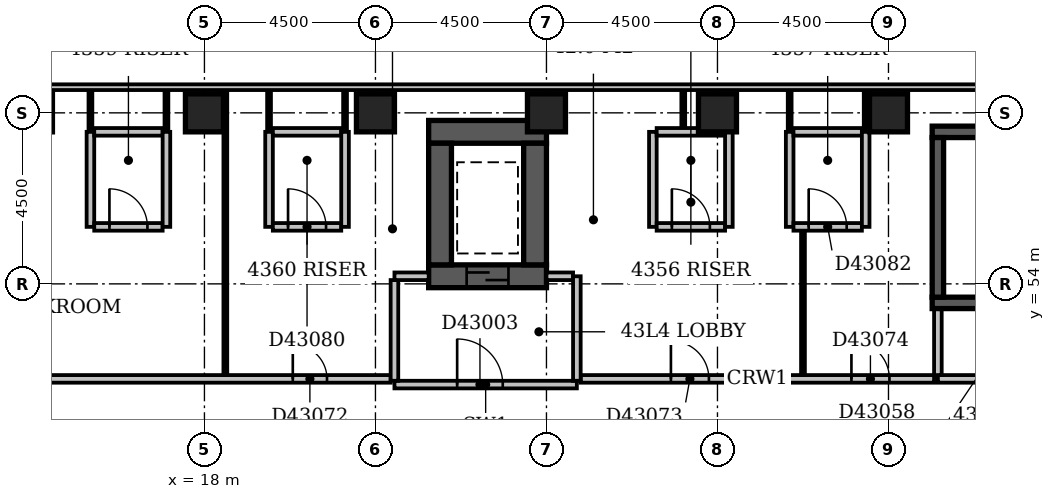
"""IFC4 building model, lengths in metres.
Left out: names, types, materials, properties, quantities, classifications, styles, units other than length and angle.
Written with IfcOpenShell. Run it as: python <this file> out.ifc"""

import sys

from ifc_helpers import new_model, si_unit, direction, frame, frame_2d, origin, origin_2d, place, context, subcontext, project, spatial, rectangle, extrude, element, fill, save


model = new_model("IFC4")
c1 = context("Model", 3, precision=1e-05, world=origin(), true_north=direction((0.0, 1.0)))
c2 = subcontext(c1, "Body", "Model", "MODEL_VIEW")
j1 = project(units=[si_unit("LENGTHUNIT", "METRE"), si_unit("PLANEANGLEUNIT", "RADIAN")], contexts=[c1])
p1 = place(None, origin())
s1 = spatial("IfcSite", under=j1, at=p1, CompositionType="ELEMENT")
p2 = place(p1, origin())
s2 = spatial("IfcBuilding", under=s1, at=p2, CompositionType="ELEMENT")
p3 = place(p2, frame((0.0, 0.0, 170.0)))
s3 = spatial("IfcBuildingStorey", under=s2, at=p3, CompositionType="ELEMENT", Elevation=170.0)
p4 = place(p3, frame((23.9, 54.2, -0.3), z_axis=(0.0, 0.0, 1.0), x_axis=(1.0, 0.0, 0.0)))
e1 = element("IfcWall", 1, at=p4, inside=s3, PredefinedType="SHEAR", context=c2, shape_type="SweptSolid", body=[
    extrude(rectangle(XDim=3.1, YDim=0.6, at=frame_2d((1.55, 0.0))), origin(), (0.0, 0.0, 1.0), 3.45),
])
p5 = place(p4, frame((1.0, 0.0, 0.3)))
e2 = element("IfcOpeningElement", 2, at=p5, cuts=e1, PredefinedType="OPENING", context=c2, shape_type="SweptSolid", body=[
    extrude(rectangle(XDim=1.1, YDim=2.1, at=frame_2d((0.55, 1.05))), frame((0.0, 0.312, 0.0), z_axis=(0.0, -1.0, 0.0), x_axis=(1.0, 0.0, 0.0)), (0.0, 0.0, 1.0), 0.624),
])
p6 = place(p3, frame((23.9, 58.0, -0.3), z_axis=(0.0, 0.0, 1.0), x_axis=(1.0, 0.0, 0.0)))
e3 = element("IfcWall", 3, at=p6, inside=s3, PredefinedType="SHEAR", context=c2, shape_type="SweptSolid", body=[
    extrude(rectangle(XDim=3.1, YDim=0.6, at=frame_2d((1.55, 0.0))), origin(), (0.0, 0.0, 1.0), 3.45),
])
for number, where, z_axis, x_axis in (
    (4, (24.2, 54.5, -0.3), (0.0, 0.0, 1.0), (0.0, 1.0, 0.0)),
    (5, (26.7, 54.5, -0.3), (0.0, 0.0, 1.0), (0.0, 1.0, 0.0)),
):
    element("IfcWall", number, at=place(p3, frame(where, z_axis=z_axis, x_axis=x_axis)), inside=s3, PredefinedType="SHEAR", context=c2, shape_type="SweptSolid", body=[
        extrude(rectangle(XDim=3.2, YDim=0.6, at=frame_2d((1.6, 0.0))), origin(), (0.0, 0.0, 1.0), 3.45),
    ])
p7 = place(p3, frame((37.15, 53.5, -0.3), z_axis=(0.0, 0.0, 1.0), x_axis=(1.0, 0.0, 0.0)))
e6 = element("IfcWall", 6, at=p7, inside=s3, PredefinedType="SHEAR", context=c2, shape_type="SweptSolid", body=[
    extrude(rectangle(XDim=7.0, YDim=0.3, at=frame_2d((3.5, 0.0))), origin(), (0.0, 0.0, 1.0), 3.45),
])
p8 = place(p7, frame((5.58, 0.0, 0.3)))
e7 = element("IfcOpeningElement", 7, at=p8, cuts=e6, PredefinedType="OPENING", context=c2, shape_type="SweptSolid", body=[
    extrude(rectangle(XDim=1.1, YDim=2.1, at=frame_2d((0.55, 1.05))), frame((0.0, 0.162, 0.0), z_axis=(0.0, -1.0, 0.0), x_axis=(1.0, 0.0, 0.0)), (0.0, 0.0, 1.0), 0.324),
])
p9 = place(p3, frame((37.15, 58.0, -0.3), z_axis=(0.0, 0.0, 1.0), x_axis=(1.0, 0.0, 0.0)))
e8 = element("IfcWall", 8, at=p9, inside=s3, PredefinedType="SHEAR", context=c2, shape_type="SweptSolid", body=[
    extrude(rectangle(XDim=7.35, YDim=0.3, at=frame_2d((3.675, 0.0))), origin(), (0.0, 0.0, 1.0), 3.45),
])
p10 = place(p3, frame((37.3, 53.65, -0.3), z_axis=(0.0, 0.0, 1.0), x_axis=(0.0, 1.0, 0.0)))
e9 = element("IfcWall", 9, at=p10, inside=s3, PredefinedType="SHEAR", context=c2, shape_type="SweptSolid", body=[
    extrude(rectangle(XDim=4.2, YDim=0.3, at=frame_2d((2.1, 0.0))), origin(), (0.0, 0.0, 1.0), 3.45),
])
for number, where, z_axis, x_axis in (
    (10, (18.0, 58.5, -0.3), (0.0, 0.0, 1.0), (1.0, 0.0, 0.0)),
    (11, (22.5, 58.5, -0.3), (0.0, 0.0, 1.0), (1.0, 0.0, 0.0)),
    (12, (27.0, 58.5, -0.3), (0.0, 0.0, 1.0), (1.0, 0.0, 0.0)),
    (13, (31.5, 58.5, -0.3), (0.0, 0.0, 1.0), (1.0, 0.0, 0.0)),
    (14, (36.0, 58.5, -0.3), (0.0, 0.0, 1.0), (1.0, 0.0, 0.0)),
):
    element("IfcColumn", number, at=place(p3, frame(where, z_axis=z_axis, x_axis=x_axis)), inside=s3, PredefinedType="COLUMN", context=c2, shape_type="SweptSolid", body=[
        extrude(rectangle(XDim=1.0, YDim=1.0, at=origin_2d()), origin(), (0.0, 0.0, 1.0), 3.45),
    ])
p11 = place(p3, frame((68.1, 59.175, 0.0), z_axis=(0.0, 0.0, 1.0), x_axis=(-1.0, 0.0, 0.0)))
e15 = element("IfcWall", 15, at=p11, inside=s3, PredefinedType="STANDARD", context=c2, shape_type="SweptSolid", body=[
    extrude(rectangle(XDim=68.85, YDim=0.15, at=frame_2d((34.425, 0.0))), origin(), (0.0, 0.0, 1.0), 2.5),
])
p12 = place(p11, frame((1.65, 0.0, 0.6)))
e16 = element("IfcOpeningElement", 16, at=p12, cuts=e15, PredefinedType="OPENING", context=c2, shape_type="SweptSolid", body=[
    extrude(rectangle(XDim=2.4, YDim=1.8, at=frame_2d((1.2, 0.9))), frame((0.0, 0.087, 0.0), z_axis=(0.0, -1.0, 0.0), x_axis=(1.0, 0.0, 0.0)), (0.0, 0.0, 1.0), 0.174),
])
p13 = place(p11, frame((5.823, 0.0, 0.6)))
e17 = element("IfcOpeningElement", 17, at=p13, cuts=e15, PredefinedType="OPENING", context=c2, shape_type="SweptSolid", body=[
    extrude(rectangle(XDim=2.1, YDim=1.8, at=frame_2d((1.05, 0.9))), frame((0.0, 0.087, 0.0), z_axis=(0.0, -1.0, 0.0), x_axis=(1.0, 0.0, 0.0)), (0.0, 0.0, 1.0), 0.174),
])
p14 = place(p11, frame((20.277, 0.0, 0.6)))
e18 = element("IfcOpeningElement", 18, at=p14, cuts=e15, PredefinedType="OPENING", context=c2, shape_type="SweptSolid", body=[
    extrude(rectangle(XDim=2.1, YDim=1.8, at=frame_2d((1.05, 0.9))), frame((0.0, 0.087, 0.0), z_axis=(0.0, -1.0, 0.0), x_axis=(1.0, 0.0, 0.0)), (0.0, 0.0, 1.0), 0.174),
])
p15 = place(p3, frame((23.0, 51.35, 0.0), z_axis=(0.0, 0.0, 1.0), x_axis=(1.0, 0.0, 0.0)))
e19 = element("IfcWall", 19, at=p15, inside=s3, PredefinedType="PARTITIONING", context=c2, shape_type="SweptSolid", body=[
    extrude(rectangle(XDim=4.8, YDim=0.2, at=frame_2d((2.4, 0.0))), origin(), (0.0, 0.0, 1.0), 3.15),
])
p16 = place(p15, frame((1.65, 0.0, 0.0)))
e20 = element("IfcOpeningElement", 20, at=p16, cuts=e19, PredefinedType="OPENING", context=c2, shape_type="SweptSolid", body=[
    extrude(rectangle(XDim=1.2, YDim=2.1, at=frame_2d((0.6, 1.05))), frame((0.0, 0.112, 0.0), z_axis=(0.0, -1.0, 0.0), x_axis=(1.0, 0.0, 0.0)), (0.0, 0.0, 1.0), 0.224),
])
p17 = place(p3, frame((27.8, 51.45, 0.0), z_axis=(0.0, 0.0, 1.0), x_axis=(0.0, 1.0, 0.0)))
e21 = element("IfcWall", 21, at=p17, inside=s3, PredefinedType="PARTITIONING", context=c2, shape_type="SweptSolid", body=[
    extrude(rectangle(XDim=2.75, YDim=0.2, at=frame_2d((1.375, 0.0))), origin(), (0.0, 0.0, 1.0), 3.15),
])
p18 = place(p3, frame((23.0, 54.2, 0.0), z_axis=(0.0, 0.0, 1.0), x_axis=(1.0, 0.0, 0.0)))
e22 = element("IfcWall", 22, at=p18, inside=s3, PredefinedType="PARTITIONING", context=c2, shape_type="SweptSolid", body=[
    extrude(rectangle(XDim=0.9, YDim=0.2, at=frame_2d((0.45, 0.0))), origin(), (0.0, 0.0, 1.0), 3.15),
])
p19 = place(p3, frame((27.0, 54.2, 0.0), z_axis=(0.0, 0.0, 1.0), x_axis=(1.0, 0.0, 0.0)))
e23 = element("IfcWall", 23, at=p19, inside=s3, PredefinedType="PARTITIONING", context=c2, shape_type="SweptSolid", body=[
    extrude(rectangle(XDim=0.7, YDim=0.2, at=frame_2d((0.35, 0.0))), origin(), (0.0, 0.0, 1.0), 3.15),
])
p20 = place(p3, frame((23.0, 51.45, 0.0), z_axis=(0.0, 0.0, 1.0), x_axis=(0.0, 1.0, 0.0)))
e24 = element("IfcWall", 24, at=p20, inside=s3, PredefinedType="PARTITIONING", context=c2, shape_type="SweptSolid", body=[
    extrude(rectangle(XDim=2.65, YDim=0.2, at=frame_2d((1.325, 0.0))), origin(), (0.0, 0.0, 1.0), 3.15),
])
p21 = place(p3, frame((37.3, 51.5, 0.0), z_axis=(0.0, 0.0, 1.0), x_axis=(1.0, 0.0, 0.0)))
e25 = element("IfcWall", 25, at=p21, inside=s3, PredefinedType="PARTITIONING", context=c2, shape_type="SweptSolid", body=[
    extrude(rectangle(XDim=6.7, YDim=0.2, at=frame_2d((3.35, 0.0))), origin(), (0.0, 0.0, 1.0), 3.15),
])
p22 = place(p21, frame((2.75, 0.0, 0.0)))
e26 = element("IfcOpeningElement", 26, at=p22, cuts=e25, PredefinedType="OPENING", context=c2, shape_type="SweptSolid", body=[
    extrude(rectangle(XDim=1.2, YDim=2.1, at=frame_2d((0.6, 1.05))), frame((0.0, 0.112, 0.0), z_axis=(0.0, -1.0, 0.0), x_axis=(1.0, 0.0, 0.0)), (0.0, 0.0, 1.0), 0.224),
])
p23 = place(p3, frame((37.3, 51.6, 0.0), z_axis=(0.0, 0.0, 1.0), x_axis=(0.0, 1.0, 0.0)))
e27 = element("IfcWall", 27, at=p23, inside=s3, PredefinedType="PARTITIONING", context=c2, shape_type="SweptSolid", body=[
    extrude(rectangle(XDim=1.73, YDim=0.2, at=frame_2d((0.865, 0.0))), origin(), (0.0, 0.0, 1.0), 3.15),
])
p24 = place(p3, frame((7.6, 51.5, 0.0), z_axis=(0.0, 0.0, 1.0), x_axis=(1.0, 0.0, 0.0)))
e28 = element("IfcWall", 28, at=p24, inside=s3, PredefinedType="PARTITIONING", context=c2, shape_type="SweptSolid", body=[
    extrude(rectangle(XDim=15.3, YDim=0.2, at=frame_2d((7.65, 0.0))), origin(), (0.0, 0.0, 1.0), 3.15),
])
p25 = place(p24, frame((4.975, 0.0, 0.0)))
e29 = element("IfcOpeningElement", 29, at=p25, cuts=e28, PredefinedType="OPENING", context=c2, shape_type="SweptSolid", body=[
    extrude(rectangle(XDim=0.9, YDim=2.1, at=frame_2d((0.45, 1.05))), frame((0.0, 0.112, 0.0), z_axis=(0.0, -1.0, 0.0), x_axis=(1.0, 0.0, 0.0)), (0.0, 0.0, 1.0), 0.224),
])
p26 = place(p24, frame((12.725, 0.0, 0.0)))
e30 = element("IfcOpeningElement", 30, at=p26, cuts=e28, PredefinedType="OPENING", context=c2, shape_type="SweptSolid", body=[
    extrude(rectangle(XDim=0.9, YDim=2.1, at=frame_2d((0.45, 1.05))), frame((0.0, 0.112, 0.0), z_axis=(0.0, -1.0, 0.0), x_axis=(1.0, 0.0, 0.0)), (0.0, 0.0, 1.0), 0.224),
])
p27 = place(p3, frame((27.9, 51.5, 0.0), z_axis=(0.0, 0.0, 1.0), x_axis=(1.0, 0.0, 0.0)))
e31 = element("IfcWall", 31, at=p27, inside=s3, PredefinedType="PARTITIONING", context=c2, shape_type="SweptSolid", body=[
    extrude(rectangle(XDim=9.3, YDim=0.2, at=frame_2d((4.65, 0.0))), origin(), (0.0, 0.0, 1.0), 3.15),
])
p28 = place(p27, frame((2.375, 0.0, 0.0)))
e32 = element("IfcOpeningElement", 32, at=p28, cuts=e31, PredefinedType="OPENING", context=c2, shape_type="SweptSolid", body=[
    extrude(rectangle(XDim=1.0, YDim=2.1, at=frame_2d((0.5, 1.05))), frame((0.0, 0.112, 0.0), z_axis=(0.0, -1.0, 0.0), x_axis=(1.0, 0.0, 0.0)), (0.0, 0.0, 1.0), 0.224),
])
p29 = place(p27, frame((7.125, 0.0, 0.0)))
e33 = element("IfcOpeningElement", 33, at=p29, cuts=e31, PredefinedType="OPENING", context=c2, shape_type="SweptSolid", body=[
    extrude(rectangle(XDim=1.0, YDim=2.1, at=frame_2d((0.5, 1.05))), frame((0.0, 0.112, 0.0), z_axis=(0.0, -1.0, 0.0), x_axis=(1.0, 0.0, 0.0)), (0.0, 0.0, 1.0), 0.224),
])
p30 = place(p3, frame((18.55, 51.6, 0.0), z_axis=(0.0, 0.0, 1.0), x_axis=(0.0, 1.0, 0.0)))
e34 = element("IfcWall", 34, at=p30, inside=s3, PredefinedType="PARTITIONING", context=c2, shape_type="SweptSolid", body=[
    extrude(rectangle(XDim=7.5, YDim=0.1, at=frame_2d((3.75, 0.0))), origin(), (0.0, 0.0, 1.0), 3.15),
])
p31 = place(p3, frame((33.75, 51.6, 0.0), z_axis=(0.0, 0.0, 1.0), x_axis=(0.0, 1.0, 0.0)))
e35 = element("IfcWall", 35, at=p31, inside=s3, PredefinedType="PARTITIONING", context=c2, shape_type="SweptSolid", body=[
    extrude(rectangle(XDim=3.8, YDim=0.1, at=frame_2d((1.9, 0.0))), origin(), (0.0, 0.0, 1.0), 3.15),
])
p32 = place(p3, frame((15.0, 55.5, 0.0), z_axis=(0.0, 0.0, 1.0), x_axis=(0.0, 1.0, 0.0)))
e36 = element("IfcWall", 36, at=p32, inside=s3, PredefinedType="PARTITIONING", context=c2, shape_type="SweptSolid", body=[
    extrude(rectangle(XDim=2.5, YDim=0.2, at=frame_2d((1.25, 0.0))), origin(), (0.0, 0.0, 1.0), 3.15),
])
p33 = place(p3, frame((15.1, 55.5, 0.0), z_axis=(0.0, 0.0, 1.0), x_axis=(1.0, 0.0, 0.0)))
e37 = element("IfcWall", 37, at=p33, inside=s3, PredefinedType="PARTITIONING", context=c2, shape_type="SweptSolid", body=[
    extrude(rectangle(XDim=1.8, YDim=0.2, at=frame_2d((0.9, 0.0))), origin(), (0.0, 0.0, 1.0), 3.15),
])
p34 = place(p33, frame((0.4, 0.0, 0.0)))
e38 = element("IfcOpeningElement", 38, at=p34, cuts=e37, PredefinedType="OPENING", context=c2, shape_type="SweptSolid", body=[
    extrude(rectangle(XDim=1.0, YDim=2.1, at=frame_2d((0.5, 1.05))), frame((0.0, 0.112, 0.0), z_axis=(0.0, -1.0, 0.0), x_axis=(1.0, 0.0, 0.0)), (0.0, 0.0, 1.0), 0.224),
])
for number, where, z_axis, x_axis in (
    (39, (17.0, 55.5, 0.0), (0.0, 0.0, 1.0), (0.0, 1.0, 0.0)),
    (40, (19.7, 55.5, 0.0), (0.0, 0.0, 1.0), (0.0, 1.0, 0.0)),
):
    element("IfcWall", number, at=place(p3, frame(where, z_axis=z_axis, x_axis=x_axis)), inside=s3, PredefinedType="PARTITIONING", context=c2, shape_type="SweptSolid", body=[
        extrude(rectangle(XDim=2.5, YDim=0.2, at=frame_2d((1.25, 0.0))), origin(), (0.0, 0.0, 1.0), 3.15),
    ])
p35 = place(p3, frame((19.8, 55.5, 0.0), z_axis=(0.0, 0.0, 1.0), x_axis=(1.0, 0.0, 0.0)))
e41 = element("IfcWall", 41, at=p35, inside=s3, PredefinedType="PARTITIONING", context=c2, shape_type="SweptSolid", body=[
    extrude(rectangle(XDim=1.8, YDim=0.2, at=frame_2d((0.9, 0.0))), origin(), (0.0, 0.0, 1.0), 3.15),
])
p36 = place(p35, frame((0.4, 0.0, 0.0)))
e42 = element("IfcOpeningElement", 42, at=p36, cuts=e41, PredefinedType="OPENING", context=c2, shape_type="SweptSolid", body=[
    extrude(rectangle(XDim=1.0, YDim=2.1, at=frame_2d((0.5, 1.05))), frame((0.0, 0.112, 0.0), z_axis=(0.0, -1.0, 0.0), x_axis=(1.0, 0.0, 0.0)), (0.0, 0.0, 1.0), 0.224),
])
for number, where, z_axis, x_axis in (
    (43, (21.7, 55.5, 0.0), (0.0, 0.0, 1.0), (0.0, 1.0, 0.0)),
    (44, (29.8, 55.5, 0.0), (0.0, 0.0, 1.0), (0.0, 1.0, 0.0)),
):
    element("IfcWall", number, at=place(p3, frame(where, z_axis=z_axis, x_axis=x_axis)), inside=s3, PredefinedType="PARTITIONING", context=c2, shape_type="SweptSolid", body=[
        extrude(rectangle(XDim=2.5, YDim=0.2, at=frame_2d((1.25, 0.0))), origin(), (0.0, 0.0, 1.0), 3.15),
    ])
p37 = place(p3, frame((29.9, 55.5, 0.0), z_axis=(0.0, 0.0, 1.0), x_axis=(1.0, 0.0, 0.0)))
e45 = element("IfcWall", 45, at=p37, inside=s3, PredefinedType="PARTITIONING", context=c2, shape_type="SweptSolid", body=[
    extrude(rectangle(XDim=1.8, YDim=0.2, at=frame_2d((0.9, 0.0))), origin(), (0.0, 0.0, 1.0), 3.15),
])
p38 = place(p37, frame((0.4, 0.0, 0.0)))
e46 = element("IfcOpeningElement", 46, at=p38, cuts=e45, PredefinedType="OPENING", context=c2, shape_type="SweptSolid", body=[
    extrude(rectangle(XDim=1.0, YDim=2.1, at=frame_2d((0.5, 1.05))), frame((0.0, 0.112, 0.0), z_axis=(0.0, -1.0, 0.0), x_axis=(1.0, 0.0, 0.0)), (0.0, 0.0, 1.0), 0.224),
])
for number, where, z_axis, x_axis in (
    (47, (31.8, 55.5, 0.0), (0.0, 0.0, 1.0), (0.0, 1.0, 0.0)),
    (48, (33.4, 55.5, 0.0), (0.0, 0.0, 1.0), (0.0, 1.0, 0.0)),
):
    element("IfcWall", number, at=place(p3, frame(where, z_axis=z_axis, x_axis=x_axis)), inside=s3, PredefinedType="PARTITIONING", context=c2, shape_type="SweptSolid", body=[
        extrude(rectangle(XDim=2.5, YDim=0.2, at=frame_2d((1.25, 0.0))), origin(), (0.0, 0.0, 1.0), 3.15),
    ])
p39 = place(p3, frame((33.5, 55.5, 0.0), z_axis=(0.0, 0.0, 1.0), x_axis=(1.0, 0.0, 0.0)))
e49 = element("IfcWall", 49, at=p39, inside=s3, PredefinedType="PARTITIONING", context=c2, shape_type="SweptSolid", body=[
    extrude(rectangle(XDim=1.8, YDim=0.2, at=frame_2d((0.9, 0.0))), origin(), (0.0, 0.0, 1.0), 3.15),
])
p40 = place(p39, frame((0.4, 0.0, 0.0)))
e50 = element("IfcOpeningElement", 50, at=p40, cuts=e49, PredefinedType="OPENING", context=c2, shape_type="SweptSolid", body=[
    extrude(rectangle(XDim=1.0, YDim=2.1, at=frame_2d((0.5, 1.05))), frame((0.0, 0.112, 0.0), z_axis=(0.0, -1.0, 0.0), x_axis=(1.0, 0.0, 0.0)), (0.0, 0.0, 1.0), 0.224),
])
p41 = place(p3, frame((35.4, 55.5, 0.0), z_axis=(0.0, 0.0, 1.0), x_axis=(0.0, 1.0, 0.0)))
e51 = element("IfcWall", 51, at=p41, inside=s3, PredefinedType="PARTITIONING", context=c2, shape_type="SweptSolid", body=[
    extrude(rectangle(XDim=2.5, YDim=0.2, at=frame_2d((1.25, 0.0))), origin(), (0.0, 0.0, 1.0), 2.25),
])
p42 = place(p3, frame((15.0, 58.0, 0.0), z_axis=(0.0, 0.0, 1.0), x_axis=(0.0, 1.0, 0.0)))
e52 = element("IfcWall", 52, at=p42, inside=s3, PredefinedType="PARTITIONING", context=c2, shape_type="SweptSolid", body=[
    extrude(rectangle(XDim=1.1, YDim=0.1, at=frame_2d((0.55, 0.0))), origin(), (0.0, 0.0, 1.0), 3.15),
])
p43 = place(p3, frame((15.1, 58.0, 0.0), z_axis=(0.0, 0.0, 1.0), x_axis=(1.0, 0.0, 0.0)))
e53 = element("IfcWall", 53, at=p43, inside=s3, PredefinedType="PARTITIONING", context=c2, shape_type="SweptSolid", body=[
    extrude(rectangle(XDim=1.8, YDim=0.2, at=frame_2d((0.9, 0.0))), origin(), (0.0, 0.0, 1.0), 3.15),
])
for number, where, z_axis, x_axis in (
    (54, (17.0, 58.0, 0.0), (0.0, 0.0, 1.0), (0.0, 1.0, 0.0)),
    (55, (19.7, 58.0, 0.0), (0.0, 0.0, 1.0), (0.0, 1.0, 0.0)),
):
    element("IfcWall", number, at=place(p3, frame(where, z_axis=z_axis, x_axis=x_axis)), inside=s3, PredefinedType="PARTITIONING", context=c2, shape_type="SweptSolid", body=[
        extrude(rectangle(XDim=1.1, YDim=0.1, at=frame_2d((0.55, 0.0))), origin(), (0.0, 0.0, 1.0), 3.15),
    ])
p44 = place(p3, frame((19.8, 58.0, 0.0), z_axis=(0.0, 0.0, 1.0), x_axis=(1.0, 0.0, 0.0)))
e56 = element("IfcWall", 56, at=p44, inside=s3, PredefinedType="PARTITIONING", context=c2, shape_type="SweptSolid", body=[
    extrude(rectangle(XDim=1.8, YDim=0.2, at=frame_2d((0.9, 0.0))), origin(), (0.0, 0.0, 1.0), 3.15),
])
p45 = place(p3, frame((21.7, 58.0, 0.0), z_axis=(0.0, 0.0, 1.0), x_axis=(0.0, 1.0, 0.0)))
e57 = element("IfcWall", 57, at=p45, inside=s3, PredefinedType="PARTITIONING", context=c2, shape_type="SweptSolid", body=[
    extrude(rectangle(XDim=1.1, YDim=0.1, at=frame_2d((0.55, 0.0))), origin(), (0.0, 0.0, 1.0), 3.15),
])
p46 = place(p3, frame((29.9, 58.0, 0.0), z_axis=(0.0, 0.0, 1.0), x_axis=(1.0, 0.0, 0.0)))
e58 = element("IfcWall", 58, at=p46, inside=s3, PredefinedType="PARTITIONING", context=c2, shape_type="SweptSolid", body=[
    extrude(rectangle(XDim=1.8, YDim=0.2, at=frame_2d((0.9, 0.0))), origin(), (0.0, 0.0, 1.0), 3.15),
])
p47 = place(p3, frame((33.4, 58.0, 0.0), z_axis=(0.0, 0.0, 1.0), x_axis=(0.0, 1.0, 0.0)))
e59 = element("IfcWall", 59, at=p47, inside=s3, PredefinedType="PARTITIONING", context=c2, shape_type="SweptSolid", body=[
    extrude(rectangle(XDim=1.1, YDim=0.1, at=frame_2d((0.55, 0.0))), origin(), (0.0, 0.0, 1.0), 3.15),
])
p48 = place(p3, frame((33.5, 58.0, 0.0), z_axis=(0.0, 0.0, 1.0), x_axis=(1.0, 0.0, 0.0)))
e60 = element("IfcWall", 60, at=p48, inside=s3, PredefinedType="PARTITIONING", context=c2, shape_type="SweptSolid", body=[
    extrude(rectangle(XDim=1.8, YDim=0.2, at=frame_2d((0.9, 0.0))), origin(), (0.0, 0.0, 1.0), 3.15),
])
p49 = place(p3, frame((35.4, 58.0, 0.0), z_axis=(0.0, 0.0, 1.0), x_axis=(0.0, 1.0, 0.0)))
e61 = element("IfcWall", 61, at=p49, inside=s3, PredefinedType="PARTITIONING", context=c2, shape_type="SweptSolid", body=[
    extrude(rectangle(XDim=1.1, YDim=0.1, at=frame_2d((0.55, 0.0))), origin(), (0.0, 0.0, 1.0), 2.25),
])
p50 = place(p3, frame((30.6, 58.1, 0.0), z_axis=(0.0, 0.0, 1.0), x_axis=(0.0, 1.0, 0.0)))
e62 = element("IfcWall", 62, at=p50, inside=s3, PredefinedType="PARTITIONING", context=c2, shape_type="SweptSolid", body=[
    extrude(rectangle(XDim=1.0, YDim=0.1, at=frame_2d((0.5, 0.0))), origin(), (0.0, 0.0, 1.0), 3.15),
])
p51 = place(p16, origin())
e63 = element("IfcDoor", 63, at=p51, inside=s3, OperationType="SINGLE_SWING_LEFT", PredefinedType="DOOR", context=c2, shape_type="SweptSolid", body=[
    extrude(rectangle(XDim=1.2, YDim=2.1, at=frame_2d((0.6, 1.05))), frame((0.0, 0.025, 0.0), z_axis=(0.0, -1.0, 0.0), x_axis=(1.0, 0.0, 0.0)), (0.0, 0.0, 1.0), 0.05),
])
fill(e20, e63)
p52 = place(p5, origin())
e64 = element("IfcDoor", 64, at=p52, inside=s3, OperationType="SLIDING_TO_LEFT", PredefinedType="DOOR", context=c2, shape_type="SweptSolid", body=[
    extrude(rectangle(XDim=1.1, YDim=2.1, at=frame_2d((0.55, 1.05))), frame((0.0, 0.025, 0.0), z_axis=(0.0, -1.0, 0.0), x_axis=(1.0, 0.0, 0.0)), (0.0, 0.0, 1.0), 0.05),
])
fill(e2, e64)
p53 = place(p26, origin())
e65 = element("IfcDoor", 65, at=p53, inside=s3, OperationType="SINGLE_SWING_LEFT", PredefinedType="DOOR", context=c2, shape_type="SweptSolid", body=[
    extrude(rectangle(XDim=0.9, YDim=2.1, at=frame_2d((0.45, 1.05))), frame((0.0, 0.025, 0.0), z_axis=(0.0, -1.0, 0.0), x_axis=(1.0, 0.0, 0.0)), (0.0, 0.0, 1.0), 0.05),
])
fill(e30, e65)
p54 = place(p28, origin())
e66 = element("IfcDoor", 66, at=p54, inside=s3, OperationType="SINGLE_SWING_LEFT", PredefinedType="DOOR", context=c2, shape_type="SweptSolid", body=[
    extrude(rectangle(XDim=1.0, YDim=2.1, at=frame_2d((0.5, 1.05))), frame((0.0, 0.025, 0.0), z_axis=(0.0, -1.0, 0.0), x_axis=(1.0, 0.0, 0.0)), (0.0, 0.0, 1.0), 0.05),
])
fill(e32, e66)
p55 = place(p29, origin())
e67 = element("IfcDoor", 67, at=p55, inside=s3, OperationType="SINGLE_SWING_LEFT", PredefinedType="DOOR", context=c2, shape_type="SweptSolid", body=[
    extrude(rectangle(XDim=1.0, YDim=2.1, at=frame_2d((0.5, 1.05))), frame((0.0, 0.025, 0.0), z_axis=(0.0, -1.0, 0.0), x_axis=(1.0, 0.0, 0.0)), (0.0, 0.0, 1.0), 0.05),
])
fill(e33, e67)
p56 = place(p34, origin())
e68 = element("IfcDoor", 68, at=p56, inside=s3, OperationType="SINGLE_SWING_LEFT", PredefinedType="DOOR", context=c2, shape_type="SweptSolid", body=[
    extrude(rectangle(XDim=1.0, YDim=2.1, at=frame_2d((0.5, 1.05))), frame((0.0, 0.025, 0.0), z_axis=(0.0, -1.0, 0.0), x_axis=(1.0, 0.0, 0.0)), (0.0, 0.0, 1.0), 0.05),
])
fill(e38, e68)
p57 = place(p36, origin())
e69 = element("IfcDoor", 69, at=p57, inside=s3, OperationType="SINGLE_SWING_LEFT", PredefinedType="DOOR", context=c2, shape_type="SweptSolid", body=[
    extrude(rectangle(XDim=1.0, YDim=2.1, at=frame_2d((0.5, 1.05))), frame((0.0, 0.025, 0.0), z_axis=(0.0, -1.0, 0.0), x_axis=(1.0, 0.0, 0.0)), (0.0, 0.0, 1.0), 0.05),
])
fill(e42, e69)
p58 = place(p38, origin())
e70 = element("IfcDoor", 70, at=p58, inside=s3, OperationType="SINGLE_SWING_LEFT", PredefinedType="DOOR", context=c2, shape_type="SweptSolid", body=[
    extrude(rectangle(XDim=1.0, YDim=2.1, at=frame_2d((0.5, 1.05))), frame((0.0, 0.025, 0.0), z_axis=(0.0, -1.0, 0.0), x_axis=(1.0, 0.0, 0.0)), (0.0, 0.0, 1.0), 0.05),
])
fill(e46, e70)
p59 = place(p40, origin())
e71 = element("IfcDoor", 71, at=p59, inside=s3, OperationType="SINGLE_SWING_LEFT", PredefinedType="DOOR", context=c2, shape_type="SweptSolid", body=[
    extrude(rectangle(XDim=1.0, YDim=2.1, at=frame_2d((0.5, 1.05))), frame((0.0, 0.025, 0.0), z_axis=(0.0, -1.0, 0.0), x_axis=(1.0, 0.0, 0.0)), (0.0, 0.0, 1.0), 0.05),
])
fill(e50, e71)
save(model, sys.argv[1])
